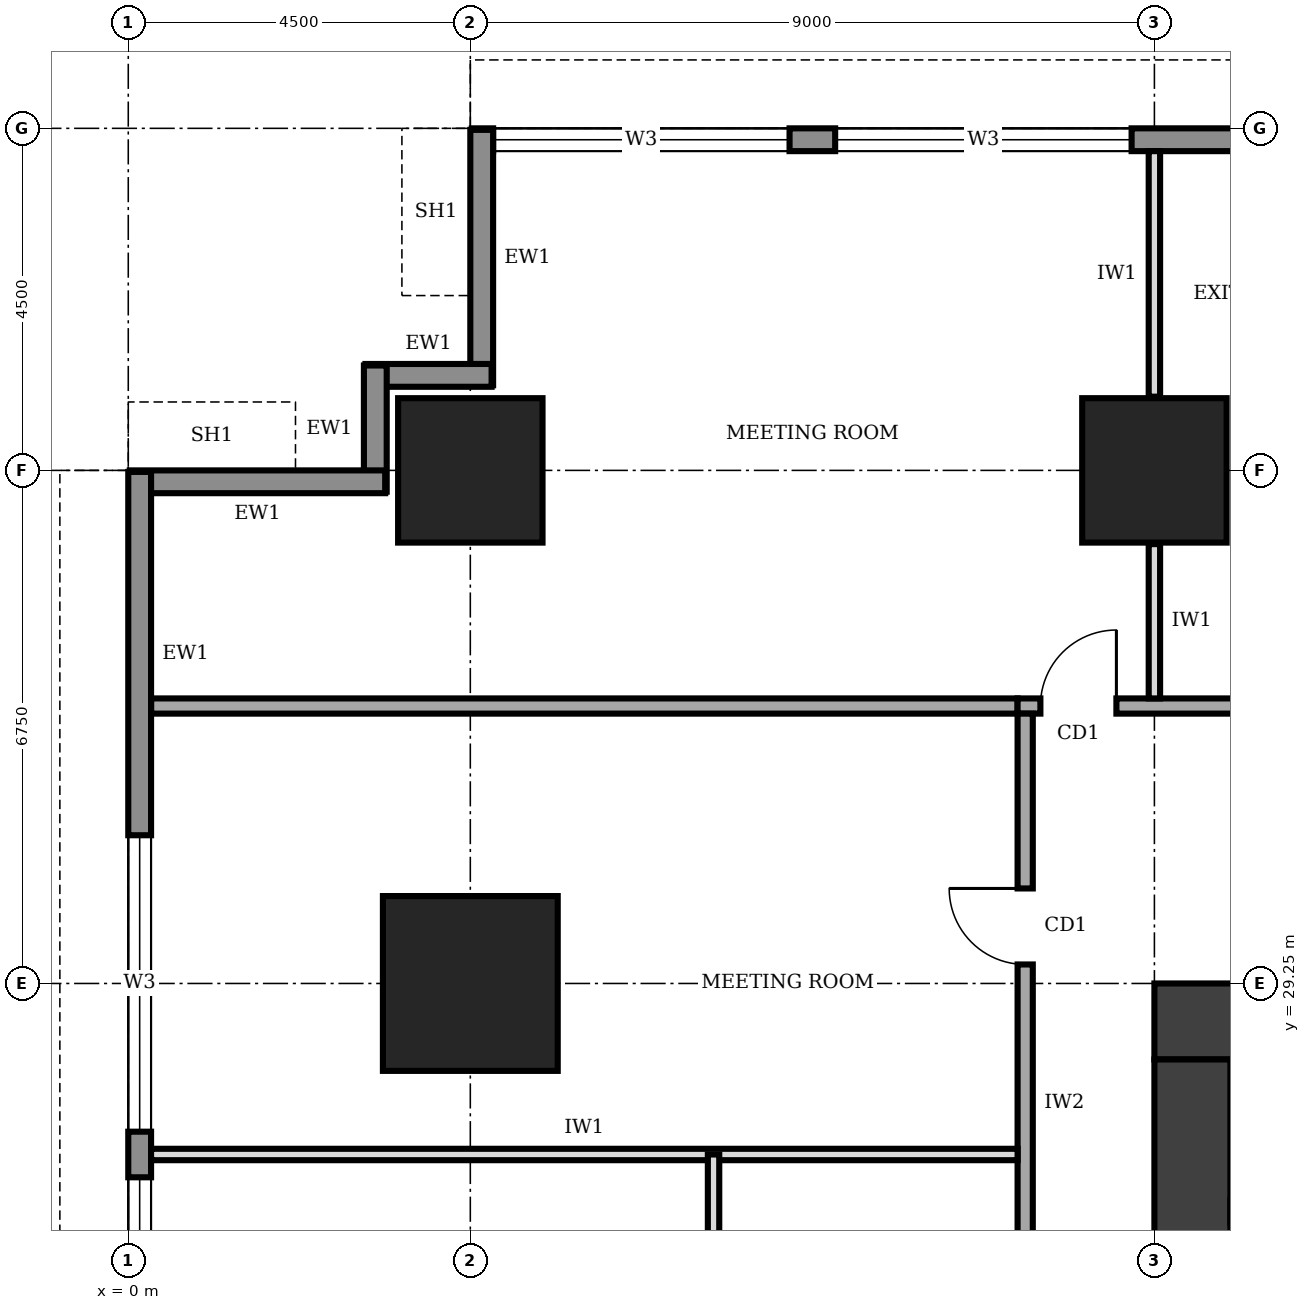
"""IFC4 building model, lengths in metres.
Left out: names, types, materials, properties, quantities, classifications, styles, units other than length and angle.
Written with IfcOpenShell. Run it as: python <this file> out.ifc"""

import sys

from ifc_helpers import new_model, si_unit, direction, frame, frame_2d, origin, origin_2d, place, context, subcontext, project, spatial, rectangle, extrude, element, fill, save


model = new_model("IFC4")
c1 = context("Model", 3, precision=1e-05, world=origin(), true_north=direction((0.0, 1.0)))
c2 = subcontext(c1, "Body", "Model", "MODEL_VIEW")
j1 = project(units=[si_unit("LENGTHUNIT", "METRE"), si_unit("PLANEANGLEUNIT", "RADIAN")], contexts=[c1])
p1 = place(None, origin())
s1 = spatial("IfcSite", under=j1, at=p1, CompositionType="ELEMENT")
p2 = place(p1, origin())
s2 = spatial("IfcBuilding", under=s1, at=p2, CompositionType="ELEMENT")
p3 = place(p2, frame((0.0, 0.0, 93.0)))
s3 = spatial("IfcBuildingStorey", under=s2, at=p3, CompositionType="ELEMENT", Elevation=93.0)
p4 = place(p3, frame((27.0, 28.75, 0.0), z_axis=(0.0, 0.0, 1.0), x_axis=(-1.0, 0.0, 0.0)))
e1 = element("IfcWall", 1, at=p4, inside=s3, PredefinedType="SHEAR", context=c2, shape_type="SweptSolid", body=[
    extrude(rectangle(XDim=13.5, YDim=1.0, at=frame_2d((6.75, 0.0))), origin(), (0.0, 0.0, 1.0), 4.0),
])
p5 = place(p4, frame((4.75, 0.0, 0.0)))
e2 = element("IfcOpeningElement", 2, at=p5, cuts=e1, PredefinedType="OPENING", context=c2, shape_type="SweptSolid", body=[
    extrude(rectangle(XDim=1.8, YDim=2.1, at=frame_2d((0.9, 1.05))), frame((0.0, 0.51, 0.0), z_axis=(0.0, -1.0, 0.0), x_axis=(1.0, 0.0, 0.0)), (0.0, 0.0, 1.0), 1.02),
])
p6 = place(p3, frame((14.0, 28.25, 0.0), z_axis=(0.0, 0.0, 1.0), x_axis=(0.0, -1.0, 0.0)))
e3 = element("IfcWall", 3, at=p6, inside=s3, PredefinedType="SHEAR", context=c2, shape_type="SweptSolid", body=[
    extrude(rectangle(XDim=16.0, YDim=1.0, at=frame_2d((8.0, 0.0))), origin(), (0.0, 0.0, 1.0), 4.0),
])
p7 = place(p3, frame((4.5, 29.25, 0.0), z_axis=(0.0, 0.0, 1.0), x_axis=(1.0, 0.0, 0.0)))
e4 = element("IfcColumn", 4, at=p7, inside=s3, PredefinedType="COLUMN", context=c2, shape_type="SweptSolid", body=[
    extrude(rectangle(XDim=2.3, YDim=2.3, at=origin_2d()), origin(), (0.0, 0.0, 1.0), 4.0),
])
for number, where, z_axis, x_axis in (
    (5, (4.5, 36.0, 0.0), (0.0, 0.0, 1.0), (1.0, 0.0, 0.0)),
    (6, (13.5, 36.0, 0.0), (0.0, 0.0, 1.0), (1.0, 0.0, 0.0)),
):
    element("IfcColumn", number, at=place(p3, frame(where, z_axis=z_axis, x_axis=x_axis)), inside=s3, PredefinedType="COLUMN", context=c2, shape_type="SweptSolid", body=[
        extrude(rectangle(XDim=1.9, YDim=1.9, at=origin_2d()), origin(), (0.0, 0.0, 1.0), 4.0),
    ])
p8 = place(p3, frame((35.98, 40.35, 0.0), z_axis=(0.0, 0.0, 1.0), x_axis=(-1.0, 0.0, 0.0)))
e7 = element("IfcWall", 7, at=p8, inside=s3, PredefinedType="STANDARD", context=c2, shape_type="SweptSolid", body=[
    extrude(rectangle(XDim=31.46, YDim=0.3, at=frame_2d((15.73, 0.0))), origin(), (0.0, 0.0, 1.0), 3.75),
])
p9 = place(p8, frame((27.28, 0.0, 0.95)))
e8 = element("IfcOpeningElement", 8, at=p9, cuts=e7, PredefinedType="OPENING", context=c2, shape_type="SweptSolid", body=[
    extrude(rectangle(XDim=3.9, YDim=1.8, at=frame_2d((1.95, 0.9))), frame((0.0, 0.16, 0.0), z_axis=(0.0, -1.0, 0.0), x_axis=(1.0, 0.0, 0.0)), (0.0, 0.0, 1.0), 0.32),
])
p10 = place(p8, frame((22.78, 0.0, 0.95)))
e9 = element("IfcOpeningElement", 9, at=p10, cuts=e7, PredefinedType="OPENING", context=c2, shape_type="SweptSolid", body=[
    extrude(rectangle(XDim=3.9, YDim=1.8, at=frame_2d((1.95, 0.9))), frame((0.0, 0.16, 0.0), z_axis=(0.0, -1.0, 0.0), x_axis=(1.0, 0.0, 0.0)), (0.0, 0.0, 1.0), 0.32),
])
p11 = place(p8, frame((4.78, 0.0, 0.95)))
e10 = element("IfcOpeningElement", 10, at=p11, cuts=e7, PredefinedType="OPENING", context=c2, shape_type="SweptSolid", body=[
    extrude(rectangle(XDim=3.9, YDim=1.8, at=frame_2d((1.95, 0.9))), frame((0.0, 0.16, 0.0), z_axis=(0.0, -1.0, 0.0), x_axis=(1.0, 0.0, 0.0)), (0.0, 0.0, 1.0), 0.32),
])
p12 = place(p3, frame((4.65, 40.48, 0.0), z_axis=(0.0, 0.0, 1.0), x_axis=(0.0, -1.0, 0.0)))
e11 = element("IfcWall", 11, at=p12, inside=s3, PredefinedType="STANDARD", context=c2, shape_type="SweptSolid", body=[
    extrude(rectangle(XDim=3.36, YDim=0.3, at=frame_2d((1.68, 0.0))), origin(), (0.0, 0.0, 1.0), 2.85),
])
for number, where, z_axis, x_axis in (
    (12, (4.78, 37.25, 0.0), (0.0, 0.0, 1.0), (-1.0, 0.0, 0.0)),
    (13, (3.25, 37.38, 0.0), (0.0, 0.0, 1.0), (0.0, -1.0, 0.0)),
):
    element("IfcWall", number, at=place(p3, frame(where, z_axis=z_axis, x_axis=x_axis)), inside=s3, PredefinedType="STANDARD", context=c2, shape_type="SweptSolid", body=[
        extrude(rectangle(XDim=1.66, YDim=0.3, at=frame_2d((0.83, 0.0))), origin(), (0.0, 0.0, 1.0), 3.75),
    ])
p13 = place(p3, frame((3.38, 35.85, 0.0), z_axis=(0.0, 0.0, 1.0), x_axis=(-1.0, 0.0, 0.0)))
e14 = element("IfcWall", 14, at=p13, inside=s3, PredefinedType="STANDARD", context=c2, shape_type="SweptSolid", body=[
    extrude(rectangle(XDim=3.36, YDim=0.3, at=frame_2d((1.68, 0.0))), origin(), (0.0, 0.0, 1.0), 2.85),
])
p14 = place(p3, frame((0.15, 35.98, 0.0), z_axis=(0.0, 0.0, 1.0), x_axis=(0.0, -1.0, 0.0)))
e15 = element("IfcWall", 15, at=p14, inside=s3, PredefinedType="STANDARD", context=c2, shape_type="SweptSolid", body=[
    extrude(rectangle(XDim=31.46, YDim=0.3, at=frame_2d((15.73, 0.0))), origin(), (0.0, 0.0, 1.0), 3.75),
])
p15 = place(p14, frame((27.28, 0.0, 0.95)))
e16 = element("IfcOpeningElement", 16, at=p15, cuts=e15, PredefinedType="OPENING", context=c2, shape_type="SweptSolid", body=[
    extrude(rectangle(XDim=3.9, YDim=1.8, at=frame_2d((1.95, 0.9))), frame((0.0, 0.16, 0.0), z_axis=(0.0, -1.0, 0.0), x_axis=(1.0, 0.0, 0.0)), (0.0, 0.0, 1.0), 0.32),
])
p16 = place(p14, frame((22.78, 0.0, 0.95)))
e17 = element("IfcOpeningElement", 17, at=p16, cuts=e15, PredefinedType="OPENING", context=c2, shape_type="SweptSolid", body=[
    extrude(rectangle(XDim=3.9, YDim=1.8, at=frame_2d((1.95, 0.9))), frame((0.0, 0.16, 0.0), z_axis=(0.0, -1.0, 0.0), x_axis=(1.0, 0.0, 0.0)), (0.0, 0.0, 1.0), 0.32),
])
p17 = place(p14, frame((18.28, 0.0, 0.95)))
e18 = element("IfcOpeningElement", 18, at=p17, cuts=e15, PredefinedType="OPENING", context=c2, shape_type="SweptSolid", body=[
    extrude(rectangle(XDim=3.9, YDim=1.8, at=frame_2d((1.95, 0.9))), frame((0.0, 0.16, 0.0), z_axis=(0.0, -1.0, 0.0), x_axis=(1.0, 0.0, 0.0)), (0.0, 0.0, 1.0), 0.32),
])
p18 = place(p14, frame((13.78, 0.0, 0.95)))
e19 = element("IfcOpeningElement", 19, at=p18, cuts=e15, PredefinedType="OPENING", context=c2, shape_type="SweptSolid", body=[
    extrude(rectangle(XDim=3.9, YDim=1.8, at=frame_2d((1.95, 0.9))), frame((0.0, 0.16, 0.0), z_axis=(0.0, -1.0, 0.0), x_axis=(1.0, 0.0, 0.0)), (0.0, 0.0, 1.0), 0.32),
])
p19 = place(p14, frame((9.28, 0.0, 0.95)))
e20 = element("IfcOpeningElement", 20, at=p19, cuts=e15, PredefinedType="OPENING", context=c2, shape_type="SweptSolid", body=[
    extrude(rectangle(XDim=3.9, YDim=1.8, at=frame_2d((1.95, 0.9))), frame((0.0, 0.16, 0.0), z_axis=(0.0, -1.0, 0.0), x_axis=(1.0, 0.0, 0.0)), (0.0, 0.0, 1.0), 0.32),
])
p20 = place(p14, frame((4.78, 0.0, 0.95)))
e21 = element("IfcOpeningElement", 21, at=p20, cuts=e15, PredefinedType="OPENING", context=c2, shape_type="SweptSolid", body=[
    extrude(rectangle(XDim=3.9, YDim=1.8, at=frame_2d((1.95, 0.9))), frame((0.0, 0.16, 0.0), z_axis=(0.0, -1.0, 0.0), x_axis=(1.0, 0.0, 0.0)), (0.0, 0.0, 1.0), 0.32),
])
p21 = place(p3, frame((40.2, 32.9, 0.0), z_axis=(0.0, 0.0, 1.0), x_axis=(-1.0, 0.0, 0.0)))
e22 = element("IfcWall", 22, at=p21, inside=s3, PredefinedType="SOLIDWALL", context=c2, shape_type="SweptSolid", body=[
    extrude(rectangle(XDim=28.5, YDim=0.2, at=frame_2d((14.25, 0.0))), origin(), (0.0, 0.0, 1.0), 3.75),
])
p22 = place(p21, frame((27.2, 0.0, 0.0)))
e23 = element("IfcOpeningElement", 23, at=p22, cuts=e22, PredefinedType="OPENING", context=c2, shape_type="SweptSolid", body=[
    extrude(rectangle(XDim=1.0, YDim=2.1, at=frame_2d((0.5, 1.05))), frame((0.0, 0.11, 0.0), z_axis=(0.0, -1.0, 0.0), x_axis=(1.0, 0.0, 0.0)), (0.0, 0.0, 1.0), 0.22),
])
p23 = place(p21, frame((23.95, 0.0, 0.0)))
e24 = element("IfcOpeningElement", 24, at=p23, cuts=e22, PredefinedType="OPENING", context=c2, shape_type="SweptSolid", body=[
    extrude(rectangle(XDim=1.0, YDim=2.1, at=frame_2d((0.5, 1.05))), frame((0.0, 0.11, 0.0), z_axis=(0.0, -1.0, 0.0), x_axis=(1.0, 0.0, 0.0)), (0.0, 0.0, 1.0), 0.22),
])
p24 = place(p21, frame((17.2, 0.0, 0.0)))
e25 = element("IfcOpeningElement", 25, at=p24, cuts=e22, PredefinedType="OPENING", context=c2, shape_type="SweptSolid", body=[
    extrude(rectangle(XDim=1.0, YDim=2.1, at=frame_2d((0.5, 1.05))), frame((0.0, 0.11, 0.0), z_axis=(0.0, -1.0, 0.0), x_axis=(1.0, 0.0, 0.0)), (0.0, 0.0, 1.0), 0.22),
])
p25 = place(p21, frame((6.0, 0.0, 0.0)))
e26 = element("IfcOpeningElement", 26, at=p25, cuts=e22, PredefinedType="OPENING", context=c2, shape_type="SweptSolid", body=[
    extrude(rectangle(XDim=1.0, YDim=2.1, at=frame_2d((0.5, 1.05))), frame((0.0, 0.11, 0.0), z_axis=(0.0, -1.0, 0.0), x_axis=(1.0, 0.0, 0.0)), (0.0, 0.0, 1.0), 0.22),
])
p26 = place(p3, frame((11.8, 32.8, 0.0), z_axis=(0.0, 0.0, 1.0), x_axis=(0.0, -1.0, 0.0)))
e27 = element("IfcWall", 27, at=p26, inside=s3, PredefinedType="SOLIDWALL", context=c2, shape_type="SweptSolid", body=[
    extrude(rectangle(XDim=25.3, YDim=0.2, at=frame_2d((12.65, 0.0))), origin(), (0.0, 0.0, 1.0), 3.75),
])
p27 = place(p26, frame((21.8, 0.0, 0.0)))
e28 = element("IfcOpeningElement", 28, at=p27, cuts=e27, PredefinedType="OPENING", context=c2, shape_type="SweptSolid", body=[
    extrude(rectangle(XDim=1.0, YDim=2.1, at=frame_2d((0.5, 1.05))), frame((0.0, 0.11, 0.0), z_axis=(0.0, -1.0, 0.0), x_axis=(1.0, 0.0, 0.0)), (0.0, 0.0, 1.0), 0.22),
])
p28 = place(p26, frame((17.7, 0.0, 0.0)))
e29 = element("IfcOpeningElement", 29, at=p28, cuts=e27, PredefinedType="OPENING", context=c2, shape_type="SweptSolid", body=[
    extrude(rectangle(XDim=1.0, YDim=2.1, at=frame_2d((0.5, 1.05))), frame((0.0, 0.11, 0.0), z_axis=(0.0, -1.0, 0.0), x_axis=(1.0, 0.0, 0.0)), (0.0, 0.0, 1.0), 0.22),
])
p29 = place(p26, frame((14.7, 0.0, 0.0)))
e30 = element("IfcOpeningElement", 30, at=p29, cuts=e27, PredefinedType="OPENING", context=c2, shape_type="SweptSolid", body=[
    extrude(rectangle(XDim=0.9, YDim=2.1, at=frame_2d((0.45, 1.05))), frame((0.0, 0.11, 0.0), z_axis=(0.0, -1.0, 0.0), x_axis=(1.0, 0.0, 0.0)), (0.0, 0.0, 1.0), 0.22),
])
p30 = place(p26, frame((11.65, 0.0, 0.0)))
e31 = element("IfcOpeningElement", 31, at=p30, cuts=e27, PredefinedType="OPENING", context=c2, shape_type="SweptSolid", body=[
    extrude(rectangle(XDim=0.9, YDim=2.1, at=frame_2d((0.45, 1.05))), frame((0.0, 0.11, 0.0), z_axis=(0.0, -1.0, 0.0), x_axis=(1.0, 0.0, 0.0)), (0.0, 0.0, 1.0), 0.22),
])
p31 = place(p26, frame((6.95, 0.0, 0.0)))
e32 = element("IfcOpeningElement", 32, at=p31, cuts=e27, PredefinedType="OPENING", context=c2, shape_type="SweptSolid", body=[
    extrude(rectangle(XDim=0.9, YDim=2.1, at=frame_2d((0.45, 1.05))), frame((0.0, 0.11, 0.0), z_axis=(0.0, -1.0, 0.0), x_axis=(1.0, 0.0, 0.0)), (0.0, 0.0, 1.0), 0.22),
])
p32 = place(p26, frame((9.5, 0.0, 0.0)))
e33 = element("IfcOpeningElement", 33, at=p32, cuts=e27, PredefinedType="OPENING", context=c2, shape_type="SweptSolid", body=[
    extrude(rectangle(XDim=1.0, YDim=2.1, at=frame_2d((0.5, 1.05))), frame((0.0, 0.11, 0.0), z_axis=(0.0, -1.0, 0.0), x_axis=(1.0, 0.0, 0.0)), (0.0, 0.0, 1.0), 0.22),
])
p33 = place(p26, frame((2.3, 0.0, 0.0)))
e34 = element("IfcOpeningElement", 34, at=p33, cuts=e27, PredefinedType="OPENING", context=c2, shape_type="SweptSolid", body=[
    extrude(rectangle(XDim=1.0, YDim=2.1, at=frame_2d((0.5, 1.05))), frame((0.0, 0.11, 0.0), z_axis=(0.0, -1.0, 0.0), x_axis=(1.0, 0.0, 0.0)), (0.0, 0.0, 1.0), 0.22),
])
p34 = place(p3, frame((0.3, 32.9, 0.0), z_axis=(0.0, 0.0, 1.0), x_axis=(1.0, 0.0, 0.0)))
e35 = element("IfcWall", 35, at=p34, inside=s3, PredefinedType="SOLIDWALL", context=c2, shape_type="SweptSolid", body=[
    extrude(rectangle(XDim=11.4, YDim=0.2, at=frame_2d((5.7, 0.0))), origin(), (0.0, 0.0, 1.0), 3.75),
])
p35 = place(p3, frame((13.5, 33.0, 0.0), z_axis=(0.0, 0.0, 1.0), x_axis=(0.0, 1.0, 0.0)))
e36 = element("IfcWall", 36, at=p35, inside=s3, PredefinedType="PARTITIONING", context=c2, shape_type="SweptSolid", body=[
    extrude(rectangle(XDim=2.03, YDim=0.15, at=frame_2d((1.015, 0.0))), origin(), (0.0, 0.0, 1.0), 2.85),
])
p36 = place(p3, frame((13.5, 36.97, 0.0), z_axis=(0.0, 0.0, 1.0), x_axis=(0.0, 1.0, 0.0)))
e37 = element("IfcWall", 37, at=p36, inside=s3, PredefinedType="PARTITIONING", context=c2, shape_type="SweptSolid", body=[
    extrude(rectangle(XDim=3.23, YDim=0.15, at=frame_2d((1.615, 0.0))), origin(), (0.0, 0.0, 1.0), 2.85),
])
p37 = place(p3, frame((0.3, 27.0, 0.0), z_axis=(0.0, 0.0, 1.0), x_axis=(1.0, 0.0, 0.0)))
e38 = element("IfcWall", 38, at=p37, inside=s3, PredefinedType="PARTITIONING", context=c2, shape_type="SweptSolid", body=[
    extrude(rectangle(XDim=11.4, YDim=0.15, at=frame_2d((5.7, 0.0))), origin(), (0.0, 0.0, 1.0), 3.75),
])
p38 = place(p3, frame((7.7, 23.8, 0.0), z_axis=(0.0, 0.0, 1.0), x_axis=(0.0, 1.0, 0.0)))
e39 = element("IfcWall", 39, at=p38, inside=s3, PredefinedType="PARTITIONING", context=c2, shape_type="SweptSolid", body=[
    extrude(rectangle(XDim=3.2, YDim=0.15, at=frame_2d((1.6, 0.0))), origin(), (0.0, 0.0, 1.0), 3.75),
])
p39 = place(p9, origin())
e40 = element("IfcWindow", 40, at=p39, inside=s3, PartitioningType="SINGLE_PANEL", PredefinedType="WINDOW", context=c2, shape_type="SweptSolid", body=[
    extrude(rectangle(XDim=3.9, YDim=1.8, at=frame_2d((1.95, 0.9))), frame((0.0, 0.03, 0.0), z_axis=(0.0, -1.0, 0.0), x_axis=(1.0, 0.0, 0.0)), (0.0, 0.0, 1.0), 0.06),
])
fill(e8, e40)
p40 = place(p10, origin())
e41 = element("IfcWindow", 41, at=p40, inside=s3, PartitioningType="SINGLE_PANEL", PredefinedType="WINDOW", context=c2, shape_type="SweptSolid", body=[
    extrude(rectangle(XDim=3.9, YDim=1.8, at=frame_2d((1.95, 0.9))), frame((0.0, 0.03, 0.0), z_axis=(0.0, -1.0, 0.0), x_axis=(1.0, 0.0, 0.0)), (0.0, 0.0, 1.0), 0.06),
])
fill(e9, e41)
p41 = place(p19, origin())
e42 = element("IfcWindow", 42, at=p41, inside=s3, PartitioningType="SINGLE_PANEL", PredefinedType="WINDOW", context=c2, shape_type="SweptSolid", body=[
    extrude(rectangle(XDim=3.9, YDim=1.8, at=frame_2d((1.95, 0.9))), frame((0.0, 0.03, 0.0), z_axis=(0.0, -1.0, 0.0), x_axis=(1.0, 0.0, 0.0)), (0.0, 0.0, 1.0), 0.06),
])
fill(e20, e42)
p42 = place(p20, origin())
e43 = element("IfcWindow", 43, at=p42, inside=s3, PartitioningType="SINGLE_PANEL", PredefinedType="WINDOW", context=c2, shape_type="SweptSolid", body=[
    extrude(rectangle(XDim=3.9, YDim=1.8, at=frame_2d((1.95, 0.9))), frame((0.0, 0.03, 0.0), z_axis=(0.0, -1.0, 0.0), x_axis=(1.0, 0.0, 0.0)), (0.0, 0.0, 1.0), 0.06),
])
fill(e21, e43)
p43 = place(p22, frame((1.0, 0.0, 0.0), z_axis=(0.0, 0.0, 1.0), x_axis=(-1.0, 0.0, 0.0)))
e44 = element("IfcDoor", 44, at=p43, inside=s3, OperationType="SINGLE_SWING_RIGHT", PredefinedType="DOOR", context=c2, shape_type="SweptSolid", body=[
    extrude(rectangle(XDim=1.0, YDim=2.1, at=frame_2d((0.5, 1.05))), frame((0.0, 0.025, 0.0), z_axis=(0.0, -1.0, 0.0), x_axis=(1.0, 0.0, 0.0)), (0.0, 0.0, 1.0), 0.05),
])
fill(e23, e44)
p44 = place(p33, frame((1.0, 0.0, 0.0), z_axis=(0.0, 0.0, 1.0), x_axis=(-1.0, 0.0, 0.0)))
e45 = element("IfcDoor", 45, at=p44, inside=s3, OperationType="SINGLE_SWING_RIGHT", PredefinedType="DOOR", context=c2, shape_type="SweptSolid", body=[
    extrude(rectangle(XDim=1.0, YDim=2.1, at=frame_2d((0.5, 1.05))), frame((0.0, 0.025, 0.0), z_axis=(0.0, -1.0, 0.0), x_axis=(1.0, 0.0, 0.0)), (0.0, 0.0, 1.0), 0.05),
])
fill(e34, e45)
save(model, sys.argv[1])
